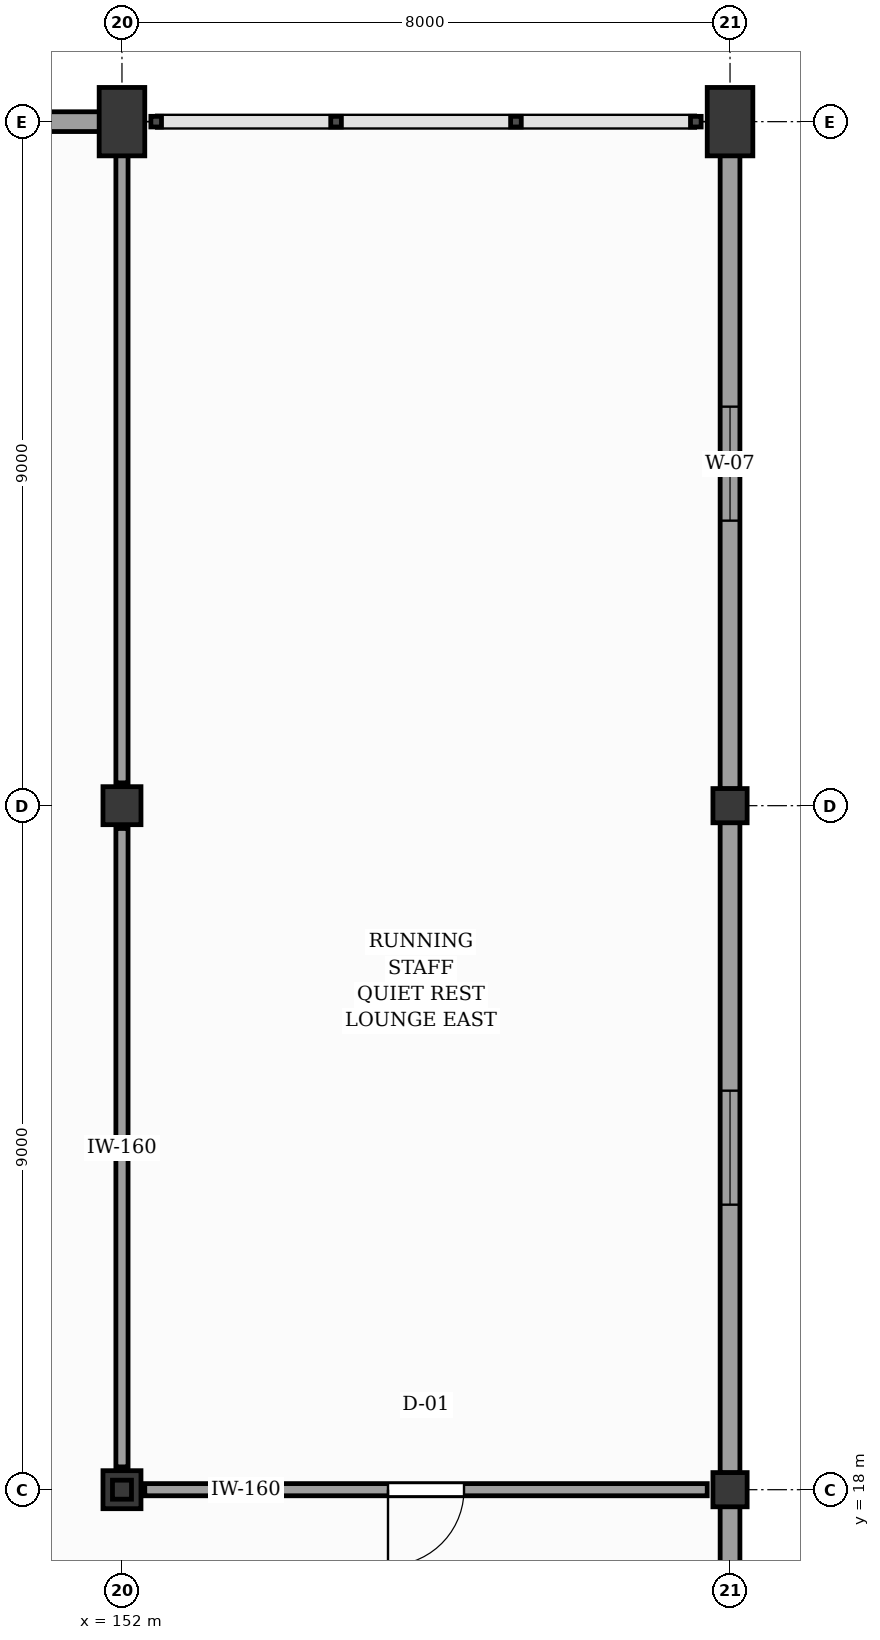
"""IFC4 building model, lengths in metres.
Left out: names, types, materials, properties, quantities, classifications, styles, units other than length and angle.
Written with IfcOpenShell. Run it as: python <this file> out.ifc"""

import sys

from ifc_helpers import new_model, si_unit, direction, frame, frame_2d, origin, origin_2d, place, context, subcontext, project, spatial, rectangle, i_section, extrude, element, fill, save


model = new_model("IFC4")
c1 = context("Model", 3, precision=1e-05, world=origin(), true_north=direction((0.0, 1.0)))
c2 = subcontext(c1, "Body", "Model", "MODEL_VIEW")
j1 = project(units=[si_unit("LENGTHUNIT", "METRE"), si_unit("PLANEANGLEUNIT", "RADIAN")], contexts=[c1])
p1 = place(None, origin())
s1 = spatial("IfcSite", under=j1, at=p1, CompositionType="ELEMENT")
p2 = place(p1, origin())
s2 = spatial("IfcBuilding", under=s1, at=p2, CompositionType="ELEMENT")
p3 = place(p2, frame((0.0, 0.0, 24.6)))
s3 = spatial("IfcBuildingStorey", under=s2, at=p3, CompositionType="ELEMENT", Elevation=24.6)
for number, where, z_axis, x_axis in (
    (1, (152.0, 18.0, 0.0), (0.0, 0.0, 1.0), (1.0, 0.0, 0.0)),
    (2, (152.0, 27.0, 0.0), (0.0, 0.0, 1.0), (1.0, 0.0, 0.0)),
):
    element("IfcColumn", number, at=place(p3, frame(where, z_axis=z_axis, x_axis=x_axis)), inside=s3, PredefinedType="COLUMN", context=c2, shape_type="SweptSolid", body=[
        extrude(rectangle(XDim=0.5, YDim=0.5, at=origin_2d()), origin(), (0.0, 0.0, 1.0), 4.2),
    ])
p4 = place(p3, frame((152.0, 36.0, 0.0), z_axis=(0.0, 0.0, 1.0), x_axis=(1.0, 0.0, 0.0)))
e3 = element("IfcColumn", 3, at=p4, inside=s3, PredefinedType="COLUMN", context=c2, shape_type="SweptSolid", body=[
    extrude(rectangle(XDim=0.6, YDim=0.9, at=origin_2d()), origin(), (0.0, 0.0, 1.0), 4.2),
])
for number, where, z_axis, x_axis in (
    (4, (160.0, 18.0, 0.0), (0.0, 0.0, 1.0), (1.0, 0.0, 0.0)),
    (5, (160.0, 27.0, 0.0), (0.0, 0.0, 1.0), (1.0, 0.0, 0.0)),
):
    element("IfcColumn", number, at=place(p3, frame(where, z_axis=z_axis, x_axis=x_axis)), inside=s3, PredefinedType="COLUMN", context=c2, shape_type="SweptSolid", body=[
        extrude(rectangle(XDim=0.45, YDim=0.45, at=origin_2d()), origin(), (0.0, 0.0, 1.0), 4.2),
    ])
p5 = place(p3, frame((160.0, 36.0, 0.0), z_axis=(0.0, 0.0, 1.0), x_axis=(1.0, 0.0, 0.0)))
e6 = element("IfcColumn", 6, at=p5, inside=s3, PredefinedType="COLUMN", context=c2, shape_type="SweptSolid", body=[
    extrude(rectangle(XDim=0.6, YDim=0.9, at=origin_2d()), origin(), (0.0, 0.0, 1.0), 4.2),
])
p6 = place(p3, frame((152.0, 18.0, 4.2), z_axis=(0.0, 0.0, 1.0), x_axis=(1.0, 0.0, 0.0)))
e7 = element("IfcColumn", 7, at=p6, inside=s3, PredefinedType="COLUMN", context=c2, shape_type="SweptSolid", body=[
    extrude(i_section(OverallWidth=0.25, OverallDepth=0.25, WebThickness=0.009, FlangeThickness=0.01, FilletRadius=0.01, at=origin_2d()), origin(), (0.0, 0.0, 1.0), 3.25),
])
p7 = place(p3, frame((144.295, 36.0, 0.0), z_axis=(0.0, 0.0, 1.0), x_axis=(1.0, 0.0, 0.0)))
e8 = element("IfcWall", 8, at=p7, inside=s3, PredefinedType="SOLIDWALL", context=c2, shape_type="SweptSolid", body=[
    extrude(rectangle(XDim=7.41, YDim=0.26, at=frame_2d((3.705, 0.0))), origin(), (0.0, 0.0, 1.0), 3.24),
])
p8 = place(p7, frame((2.705, 0.0, 1.45)))
e9 = element("IfcOpeningElement", 9, at=p8, cuts=e8, PredefinedType="OPENING", context=c2, shape_type="SweptSolid", body=[
    extrude(rectangle(XDim=2.0, YDim=1.55, at=frame_2d((1.0, 0.775))), frame((0.0, 0.14, 0.0), z_axis=(0.0, -1.0, 0.0), x_axis=(1.0, 0.0, 0.0)), (0.0, 0.0, 1.0), 0.28),
])
p9 = place(p3, frame((160.0, 9.22, 0.0), z_axis=(0.0, 0.0, 1.0), x_axis=(0.0, 1.0, 0.0)))
e10 = element("IfcWall", 10, at=p9, inside=s3, PredefinedType="SOLIDWALL", context=c2, shape_type="SweptSolid", body=[
    extrude(rectangle(XDim=8.56, YDim=0.26, at=frame_2d((4.28, 0.0))), origin(), (0.0, 0.0, 1.0), 3.24),
])
p10 = place(p9, frame((3.53, 0.0, 0.95)))
e11 = element("IfcOpeningElement", 11, at=p10, cuts=e10, PredefinedType="OPENING", context=c2, shape_type="SweptSolid", body=[
    extrude(rectangle(XDim=1.5, YDim=1.9, at=frame_2d((0.75, 0.95))), frame((0.0, 0.14, 0.0), z_axis=(0.0, -1.0, 0.0), x_axis=(1.0, 0.0, 0.0)), (0.0, 0.0, 1.0), 0.28),
])
p11 = place(p3, frame((160.0, 18.22, 0.0), z_axis=(0.0, 0.0, 1.0), x_axis=(0.0, 1.0, 0.0)))
e12 = element("IfcWall", 12, at=p11, inside=s3, PredefinedType="SOLIDWALL", context=c2, shape_type="SweptSolid", body=[
    extrude(rectangle(XDim=8.56, YDim=0.26, at=frame_2d((4.28, 0.0))), origin(), (0.0, 0.0, 1.0), 3.24),
])
p12 = place(p11, frame((3.53, 0.0, 0.95)))
e13 = element("IfcOpeningElement", 13, at=p12, cuts=e12, PredefinedType="OPENING", context=c2, shape_type="SweptSolid", body=[
    extrude(rectangle(XDim=1.5, YDim=1.9, at=frame_2d((0.75, 0.95))), frame((0.0, 0.14, 0.0), z_axis=(0.0, -1.0, 0.0), x_axis=(1.0, 0.0, 0.0)), (0.0, 0.0, 1.0), 0.28),
])
p13 = place(p3, frame((160.0, 27.22, 0.0), z_axis=(0.0, 0.0, 1.0), x_axis=(0.0, 1.0, 0.0)))
e14 = element("IfcWall", 14, at=p13, inside=s3, PredefinedType="SOLIDWALL", context=c2, shape_type="SweptSolid", body=[
    extrude(rectangle(XDim=8.38, YDim=0.26, at=frame_2d((4.19, 0.0))), origin(), (0.0, 0.0, 1.0), 3.24),
])
p14 = place(p13, frame((3.53, 0.0, 0.95)))
e15 = element("IfcOpeningElement", 15, at=p14, cuts=e14, PredefinedType="OPENING", context=c2, shape_type="SweptSolid", body=[
    extrude(rectangle(XDim=1.5, YDim=1.9, at=frame_2d((0.75, 0.95))), frame((0.0, 0.14, 0.0), z_axis=(0.0, -1.0, 0.0), x_axis=(1.0, 0.0, 0.0)), (0.0, 0.0, 1.0), 0.28),
])
p15 = place(p3, frame((152.3, 18.0, 0.0), z_axis=(0.0, 0.0, 1.0), x_axis=(1.0, 0.0, 0.0)))
e16 = element("IfcWall", 16, at=p15, inside=s3, PredefinedType="PARTITIONING", context=c2, shape_type="SweptSolid", body=[
    extrude(rectangle(XDim=7.4, YDim=0.16, at=frame_2d((3.7, 0.0))), origin(), (0.0, 0.0, 1.0), 3.1),
])
p16 = place(p15, frame((3.2, 0.0, 0.0)))
e17 = element("IfcOpeningElement", 17, at=p16, cuts=e16, PredefinedType="OPENING", context=c2, shape_type="SweptSolid", body=[
    extrude(rectangle(XDim=1.0, YDim=2.1, at=frame_2d((0.5, 1.05))), frame((0.0, 0.09, 0.0), z_axis=(0.0, -1.0, 0.0), x_axis=(1.0, 0.0, 0.0)), (0.0, 0.0, 1.0), 0.18),
])
for number, where, z_axis, x_axis in (
    (18, (152.0, 18.3, 0.0), (0.0, 0.0, 1.0), (0.0, 1.0, 0.0)),
    (19, (152.0, 27.3, 0.0), (0.0, 0.0, 1.0), (0.0, 1.0, 0.0)),
):
    element("IfcWall", number, at=place(p3, frame(where, z_axis=z_axis, x_axis=x_axis)), inside=s3, PredefinedType="PARTITIONING", context=c2, shape_type="SweptSolid", body=[
        extrude(rectangle(XDim=8.4, YDim=0.16, at=frame_2d((4.2, 0.0))), origin(), (0.0, 0.0, 1.0), 3.1),
    ])
p17 = place(p12, origin())
e20 = element("IfcWindow", 20, at=p17, inside=s3, PartitioningType="SINGLE_PANEL", PredefinedType="WINDOW", context=c2, shape_type="SweptSolid", body=[
    extrude(rectangle(XDim=1.5, YDim=1.9, at=frame_2d((0.75, 0.95))), frame((0.0, 0.03, 0.0), z_axis=(0.0, -1.0, 0.0), x_axis=(1.0, 0.0, 0.0)), (0.0, 0.0, 1.0), 0.06),
])
fill(e13, e20)
p18 = place(p14, origin())
e21 = element("IfcWindow", 21, at=p18, inside=s3, PartitioningType="SINGLE_PANEL", PredefinedType="WINDOW", context=c2, shape_type="SweptSolid", body=[
    extrude(rectangle(XDim=1.5, YDim=1.9, at=frame_2d((0.75, 0.95))), frame((0.0, 0.03, 0.0), z_axis=(0.0, -1.0, 0.0), x_axis=(1.0, 0.0, 0.0)), (0.0, 0.0, 1.0), 0.06),
])
fill(e15, e21)
p19 = place(p16, frame((1.0, 0.0, 0.0), z_axis=(0.0, 0.0, 1.0), x_axis=(-1.0, 0.0, 0.0)))
e22 = element("IfcDoor", 22, at=p19, inside=s3, OperationType="SINGLE_SWING_LEFT", PredefinedType="DOOR", context=c2, shape_type="SweptSolid", body=[
    extrude(rectangle(XDim=1.0, YDim=2.1, at=frame_2d((0.5, 1.05))), frame((0.0, 0.025, 0.0), z_axis=(0.0, -1.0, 0.0), x_axis=(1.0, 0.0, 0.0)), (0.0, 0.0, 1.0), 0.05),
])
fill(e17, e22)
save(model, sys.argv[1])
